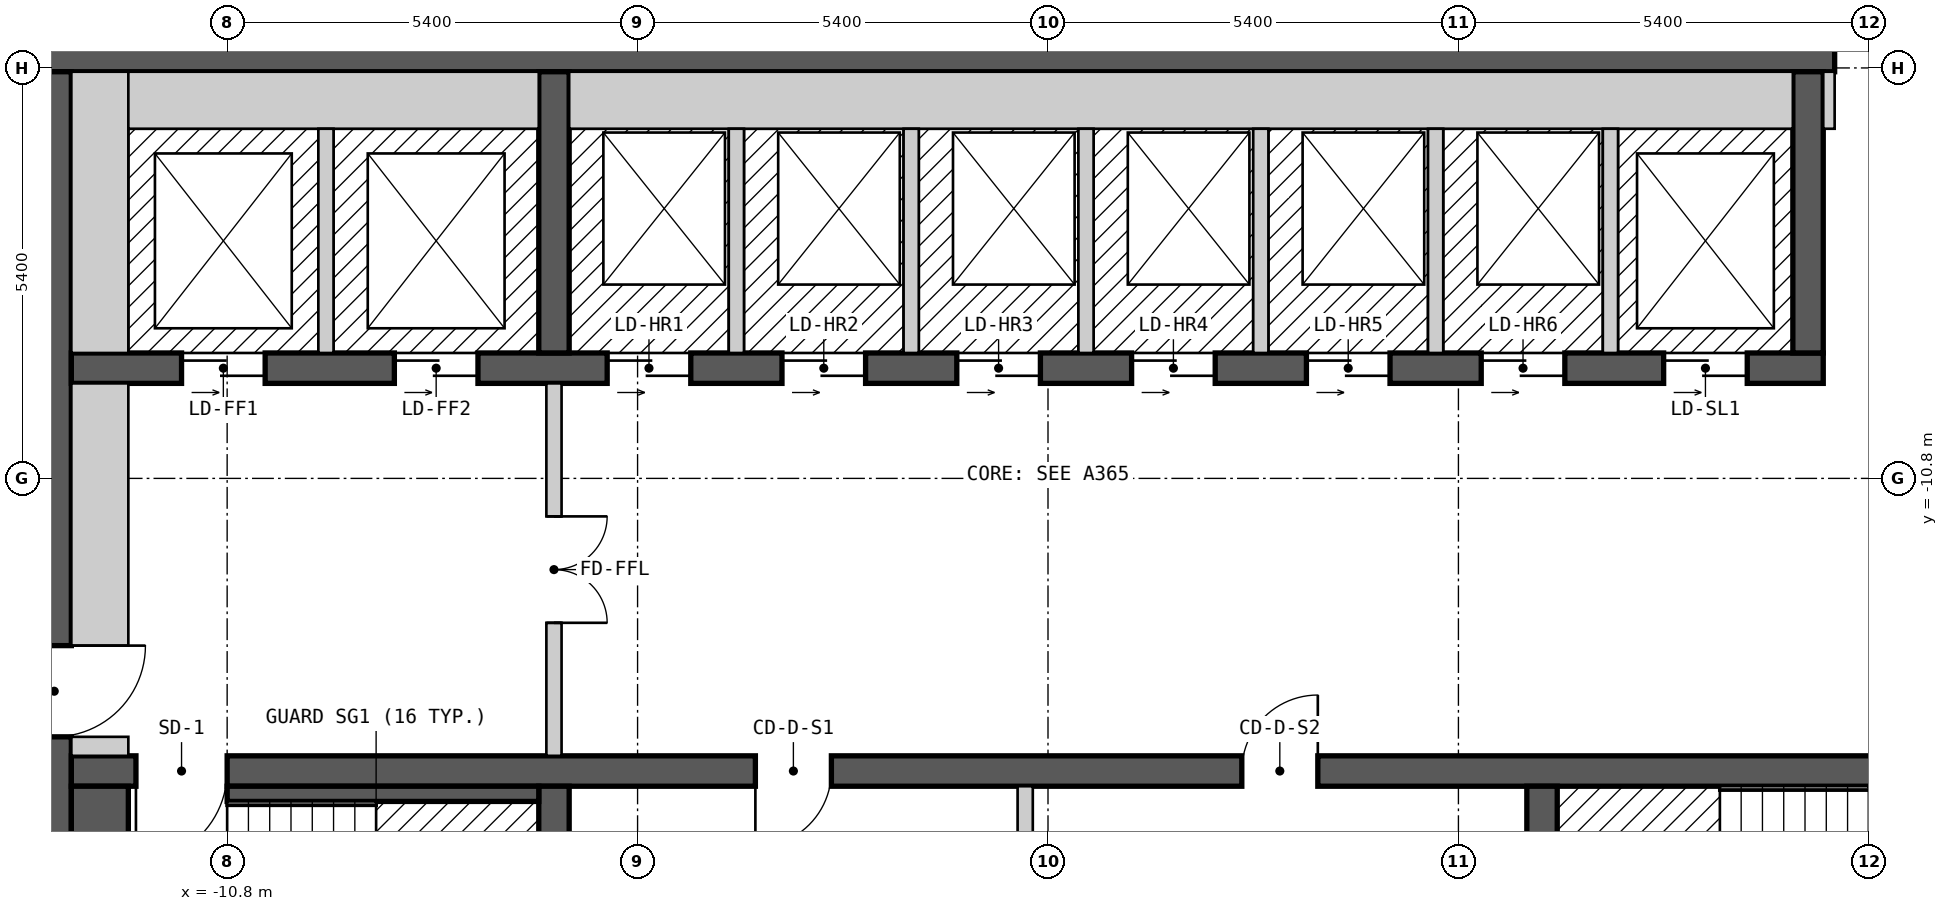
"""IFC4 building model, lengths in metres.
Left out: names, types, materials, properties, quantities, classifications, styles, units other than length and angle.
Written with IfcOpenShell. Run it as: python <this file> out.ifc"""

import sys

from ifc_helpers import new_model, si_unit, direction, frame, frame_2d, origin, place, context, subcontext, project, spatial, rectangle, extrude, element, fill, save


model = new_model("IFC4")
c1 = context("Model", 3, precision=1e-05, world=origin(), true_north=direction((0.0, 1.0)))
c2 = subcontext(c1, "Body", "Model", "MODEL_VIEW")
j1 = project(units=[si_unit("LENGTHUNIT", "METRE"), si_unit("PLANEANGLEUNIT", "RADIAN")], contexts=[c1])
p1 = place(None, origin())
s1 = spatial("IfcSite", under=j1, at=p1, CompositionType="ELEMENT")
p2 = place(p1, origin())
s2 = spatial("IfcBuilding", under=s1, at=p2, CompositionType="ELEMENT")
p3 = place(p2, frame((0.0, 0.0, 238.8)))
s3 = spatial("IfcBuildingStorey", under=s2, at=p3, CompositionType="ELEMENT", Elevation=238.8)
p4 = place(p3, frame((-13.3, -5.225, 0.0), z_axis=(0.0, 0.0, 1.0), x_axis=(1.0, 0.0, 0.0)))
e1 = element("IfcWall", 1, at=p4, inside=s3, PredefinedType="SHEAR", context=c2, shape_type="SweptSolid", body=[
    extrude(rectangle(XDim=26.6, YDim=0.45, at=frame_2d((13.3, 0.0))), origin(), (0.0, 0.0, 1.0), 2.7),
])
p5 = place(p4, frame((23.65, 0.0, 0.0)))
e2 = element("IfcOpeningElement", 2, at=p5, cuts=e1, PredefinedType="OPENING", context=c2, shape_type="SweptSolid", body=[
    extrude(rectangle(XDim=1.2, YDim=2.1, at=frame_2d((0.6, 1.05))), frame((0.0, 0.235, 0.0), z_axis=(0.0, -1.0, 0.0), x_axis=(1.0, 0.0, 0.0)), (0.0, 0.0, 1.0), 0.47),
])
p6 = place(p3, frame((-13.075, -18.55, 0.0), z_axis=(0.0, 0.0, 1.0), x_axis=(0.0, 1.0, 0.0)))
e3 = element("IfcWall", 3, at=p6, inside=s3, PredefinedType="SHEAR", context=c2, shape_type="SweptSolid", body=[
    extrude(rectangle(XDim=13.1, YDim=0.45, at=frame_2d((6.55, 0.0))), origin(), (0.0, 0.0, 1.0), 2.7),
])
p7 = place(p6, frame((4.35, 0.0, 0.0)))
e4 = element("IfcOpeningElement", 4, at=p7, cuts=e3, PredefinedType="OPENING", context=c2, shape_type="SweptSolid", body=[
    extrude(rectangle(XDim=1.2, YDim=2.1, at=frame_2d((0.6, 1.05))), frame((0.0, 0.235, 0.0), z_axis=(0.0, -1.0, 0.0), x_axis=(1.0, 0.0, 0.0)), (0.0, 0.0, 1.0), 0.47),
])
p8 = place(p3, frame((-12.85, -14.65, 0.0), z_axis=(0.0, 0.0, 1.0), x_axis=(1.0, 0.0, 0.0)))
e5 = element("IfcWall", 5, at=p8, inside=s3, PredefinedType="SHEAR", context=c2, shape_type="SweptSolid", body=[
    extrude(rectangle(XDim=25.7, YDim=0.4, at=frame_2d((12.85, 0.0))), origin(), (0.0, 0.0, 1.0), 2.7),
])
p9 = place(p8, frame((2.05, 0.0, 0.0), z_axis=(0.0, 0.0, 1.0), x_axis=(-1.0, 0.0, 0.0)))
e6 = element("IfcOpeningElement", 6, at=p9, cuts=e5, PredefinedType="OPENING", context=c2, shape_type="SweptSolid", body=[
    extrude(rectangle(XDim=1.2, YDim=2.1, at=frame_2d((0.6, 1.05))), frame((0.0, 0.21, 0.0), z_axis=(0.0, -1.0, 0.0), x_axis=(1.0, 0.0, 0.0)), (0.0, 0.0, 1.0), 0.42),
])
p10 = place(p8, frame((24.9, 0.0, 0.0), z_axis=(0.0, 0.0, 1.0), x_axis=(-1.0, 0.0, 0.0)))
e7 = element("IfcOpeningElement", 7, at=p10, cuts=e5, PredefinedType="OPENING", context=c2, shape_type="SweptSolid", body=[
    extrude(rectangle(XDim=1.2, YDim=2.1, at=frame_2d((0.6, 1.05))), frame((0.0, 0.21, 0.0), z_axis=(0.0, -1.0, 0.0), x_axis=(1.0, 0.0, 0.0)), (0.0, 0.0, 1.0), 0.42),
])
p11 = place(p8, frame((10.0, 0.0, 0.0), z_axis=(0.0, 0.0, 1.0), x_axis=(-1.0, 0.0, 0.0)))
e8 = element("IfcOpeningElement", 8, at=p11, cuts=e5, PredefinedType="OPENING", context=c2, shape_type="SweptSolid", body=[
    extrude(rectangle(XDim=1.0, YDim=2.1, at=frame_2d((0.5, 1.05))), frame((0.0, 0.21, 0.0), z_axis=(0.0, -1.0, 0.0), x_axis=(1.0, 0.0, 0.0)), (0.0, 0.0, 1.0), 0.42),
])
p12 = place(p8, frame((16.4, 0.0, 0.0), z_axis=(0.0, 0.0, 1.0), x_axis=(-1.0, 0.0, 0.0)))
e9 = element("IfcOpeningElement", 9, at=p12, cuts=e5, PredefinedType="OPENING", context=c2, shape_type="SweptSolid", body=[
    extrude(rectangle(XDim=1.0, YDim=2.1, at=frame_2d((0.5, 1.05))), frame((0.0, 0.21, 0.0), z_axis=(0.0, -1.0, 0.0), x_axis=(1.0, 0.0, 0.0)), (0.0, 0.0, 1.0), 0.42),
])
p13 = place(p3, frame((-12.85, -9.35, 0.0), z_axis=(0.0, 0.0, 1.0), x_axis=(1.0, 0.0, 0.0)))
e10 = element("IfcWall", 10, at=p13, inside=s3, PredefinedType="SHEAR", context=c2, shape_type="SweptSolid", body=[
    extrude(rectangle(XDim=23.05, YDim=0.4, at=frame_2d((11.525, 0.0))), origin(), (0.0, 0.0, 1.0), 2.7),
])
p14 = place(p13, frame((1.45, 0.0, 0.0)))
e11 = element("IfcOpeningElement", 11, at=p14, cuts=e10, PredefinedType="OPENING", context=c2, shape_type="SweptSolid", body=[
    extrude(rectangle(XDim=1.1, YDim=2.1, at=frame_2d((0.55, 1.05))), frame((0.0, 0.21, 0.0), z_axis=(0.0, -1.0, 0.0), x_axis=(1.0, 0.0, 0.0)), (0.0, 0.0, 1.0), 0.42),
])
p15 = place(p13, frame((4.25, 0.0, 0.0)))
e12 = element("IfcOpeningElement", 12, at=p15, cuts=e10, PredefinedType="OPENING", context=c2, shape_type="SweptSolid", body=[
    extrude(rectangle(XDim=1.1, YDim=2.1, at=frame_2d((0.55, 1.05))), frame((0.0, 0.21, 0.0), z_axis=(0.0, -1.0, 0.0), x_axis=(1.0, 0.0, 0.0)), (0.0, 0.0, 1.0), 0.42),
])
p16 = place(p13, frame((7.05, 0.0, 0.0)))
e13 = element("IfcOpeningElement", 13, at=p16, cuts=e10, PredefinedType="OPENING", context=c2, shape_type="SweptSolid", body=[
    extrude(rectangle(XDim=1.1, YDim=2.1, at=frame_2d((0.55, 1.05))), frame((0.0, 0.21, 0.0), z_axis=(0.0, -1.0, 0.0), x_axis=(1.0, 0.0, 0.0)), (0.0, 0.0, 1.0), 0.42),
])
p17 = place(p13, frame((9.35, 0.0, 0.0)))
e14 = element("IfcOpeningElement", 14, at=p17, cuts=e10, PredefinedType="OPENING", context=c2, shape_type="SweptSolid", body=[
    extrude(rectangle(XDim=1.1, YDim=2.1, at=frame_2d((0.55, 1.05))), frame((0.0, 0.21, 0.0), z_axis=(0.0, -1.0, 0.0), x_axis=(1.0, 0.0, 0.0)), (0.0, 0.0, 1.0), 0.42),
])
p18 = place(p13, frame((11.65, 0.0, 0.0)))
e15 = element("IfcOpeningElement", 15, at=p18, cuts=e10, PredefinedType="OPENING", context=c2, shape_type="SweptSolid", body=[
    extrude(rectangle(XDim=1.1, YDim=2.1, at=frame_2d((0.55, 1.05))), frame((0.0, 0.21, 0.0), z_axis=(0.0, -1.0, 0.0), x_axis=(1.0, 0.0, 0.0)), (0.0, 0.0, 1.0), 0.42),
])
p19 = place(p13, frame((13.95, 0.0, 0.0)))
e16 = element("IfcOpeningElement", 16, at=p19, cuts=e10, PredefinedType="OPENING", context=c2, shape_type="SweptSolid", body=[
    extrude(rectangle(XDim=1.1, YDim=2.1, at=frame_2d((0.55, 1.05))), frame((0.0, 0.21, 0.0), z_axis=(0.0, -1.0, 0.0), x_axis=(1.0, 0.0, 0.0)), (0.0, 0.0, 1.0), 0.42),
])
p20 = place(p13, frame((16.25, 0.0, 0.0)))
e17 = element("IfcOpeningElement", 17, at=p20, cuts=e10, PredefinedType="OPENING", context=c2, shape_type="SweptSolid", body=[
    extrude(rectangle(XDim=1.1, YDim=2.1, at=frame_2d((0.55, 1.05))), frame((0.0, 0.21, 0.0), z_axis=(0.0, -1.0, 0.0), x_axis=(1.0, 0.0, 0.0)), (0.0, 0.0, 1.0), 0.42),
])
p21 = place(p13, frame((18.55, 0.0, 0.0)))
e18 = element("IfcOpeningElement", 18, at=p21, cuts=e10, PredefinedType="OPENING", context=c2, shape_type="SweptSolid", body=[
    extrude(rectangle(XDim=1.1, YDim=2.1, at=frame_2d((0.55, 1.05))), frame((0.0, 0.21, 0.0), z_axis=(0.0, -1.0, 0.0), x_axis=(1.0, 0.0, 0.0)), (0.0, 0.0, 1.0), 0.42),
])
p22 = place(p13, frame((20.95, 0.0, 0.0)))
e19 = element("IfcOpeningElement", 19, at=p22, cuts=e10, PredefinedType="OPENING", context=c2, shape_type="SweptSolid", body=[
    extrude(rectangle(XDim=1.1, YDim=2.1, at=frame_2d((0.55, 1.05))), frame((0.0, 0.21, 0.0), z_axis=(0.0, -1.0, 0.0), x_axis=(1.0, 0.0, 0.0)), (0.0, 0.0, 1.0), 0.42),
])
for number, where, z_axis, x_axis in (
    (20, (-6.5, -18.55, 0.0), (0.0, 0.0, 1.0), (0.0, 1.0, 0.0)),
    (21, (6.5, -18.55, 0.0), (0.0, 0.0, 1.0), (0.0, 1.0, 0.0)),
    (22, (-6.5, -9.15, 0.0), (0.0, 0.0, 1.0), (0.0, 1.0, 0.0)),
    (23, (10.0, -9.15, 0.0), (0.0, 0.0, 1.0), (0.0, 1.0, 0.0)),
):
    element("IfcWall", number, at=place(p3, frame(where, z_axis=z_axis, x_axis=x_axis)), inside=s3, PredefinedType="SHEAR", context=c2, shape_type="SweptSolid", body=[
        extrude(rectangle(XDim=3.7, YDim=0.4, at=frame_2d((1.85, 0.0))), origin(), (0.0, 0.0, 1.0), 2.7),
    ])
p23 = place(p3, frame((-12.475, -18.55, 0.0), z_axis=(0.0, 0.0, 1.0), x_axis=(0.0, 1.0, 0.0)))
e24 = element("IfcWall", 24, at=p23, inside=s3, PredefinedType="SOLIDWALL", context=c2, shape_type="SweptSolid", body=[
    extrude(rectangle(XDim=3.7, YDim=0.75, at=frame_2d((1.85, 0.0))), origin(), (0.0, 0.0, 1.0), 2.7),
])
p24 = place(p3, frame((-12.85, -14.325, 0.0), z_axis=(0.0, 0.0, 1.0), x_axis=(1.0, 0.0, 0.0)))
e25 = element("IfcWall", 25, at=p24, inside=s3, PredefinedType="PARTITIONING", context=c2, shape_type="SweptSolid", body=[
    extrude(rectangle(XDim=0.75, YDim=0.25, at=frame_2d((0.375, 0.0))), origin(), (0.0, 0.0, 1.0), 2.7),
])
p25 = place(p3, frame((-12.475, -13.0, 0.0), z_axis=(0.0, 0.0, 1.0), x_axis=(0.0, 1.0, 0.0)))
e26 = element("IfcWall", 26, at=p25, inside=s3, PredefinedType="PARTITIONING", context=c2, shape_type="SweptSolid", body=[
    extrude(rectangle(XDim=3.45, YDim=0.75, at=frame_2d((1.725, 0.0))), origin(), (0.0, 0.0, 1.0), 2.7),
])
p26 = place(p3, frame((-12.475, -9.15, 0.0), z_axis=(0.0, 0.0, 1.0), x_axis=(0.0, 1.0, 0.0)))
e27 = element("IfcWall", 27, at=p26, inside=s3, PredefinedType="SOLIDWALL", context=c2, shape_type="SweptSolid", body=[
    extrude(rectangle(XDim=3.7, YDim=0.75, at=frame_2d((1.85, 0.0))), origin(), (0.0, 0.0, 1.0), 2.7),
])
p27 = place(p3, frame((-12.1, -5.825, 0.0), z_axis=(0.0, 0.0, 1.0), x_axis=(1.0, 0.0, 0.0)))
e28 = element("IfcWall", 28, at=p27, inside=s3, PredefinedType="SOLIDWALL", context=c2, shape_type="SweptSolid", body=[
    extrude(rectangle(XDim=5.4, YDim=0.75, at=frame_2d((2.7, 0.0))), origin(), (0.0, 0.0, 1.0), 2.7),
])
p28 = place(p3, frame((-10.8, -14.95, 0.0), z_axis=(0.0, 0.0, 1.0), x_axis=(1.0, 0.0, 0.0)))
e29 = element("IfcWall", 29, at=p28, inside=s3, PredefinedType="SOLIDWALL", context=c2, shape_type="SweptSolid", body=[
    extrude(rectangle(XDim=4.1, YDim=0.2, at=frame_2d((2.05, 0.0))), origin(), (0.0, 0.0, 1.0), 2.7),
])
p29 = place(p3, frame((-9.5, -9.15, 0.0), z_axis=(0.0, 0.0, 1.0), x_axis=(0.0, 1.0, 0.0)))
e30 = element("IfcWall", 30, at=p29, inside=s3, PredefinedType="SOLIDWALL", context=c2, shape_type="SweptSolid", body=[
    extrude(rectangle(XDim=2.95, YDim=0.2, at=frame_2d((1.475, 0.0))), origin(), (0.0, 0.0, 1.0), 2.7),
])
p30 = place(p3, frame((-6.5, -14.45, 0.0), z_axis=(0.0, 0.0, 1.0), x_axis=(0.0, 1.0, 0.0)))
e31 = element("IfcWall", 31, at=p30, inside=s3, PredefinedType="PARTITIONING", context=c2, shape_type="SweptSolid", body=[
    extrude(rectangle(XDim=4.9, YDim=0.2, at=frame_2d((2.45, 0.0))), origin(), (0.0, 0.0, 1.0), 2.7),
])
p31 = place(p30, frame((3.15, 0.0, 0.0), z_axis=(0.0, 0.0, 1.0), x_axis=(-1.0, 0.0, 0.0)))
e32 = element("IfcOpeningElement", 32, at=p31, cuts=e31, PredefinedType="OPENING", context=c2, shape_type="SweptSolid", body=[
    extrude(rectangle(XDim=1.4, YDim=2.1, at=frame_2d((0.7, 1.05))), frame((0.0, 0.11, 0.0), z_axis=(0.0, -1.0, 0.0), x_axis=(1.0, 0.0, 0.0)), (0.0, 0.0, 1.0), 0.22),
])
p32 = place(p3, frame((-6.3, -5.825, 0.0), z_axis=(0.0, 0.0, 1.0), x_axis=(1.0, 0.0, 0.0)))
e33 = element("IfcWall", 33, at=p32, inside=s3, PredefinedType="SOLIDWALL", context=c2, shape_type="SweptSolid", body=[
    extrude(rectangle(XDim=16.1, YDim=0.75, at=frame_2d((8.05, 0.0))), origin(), (0.0, 0.0, 1.0), 2.7),
])
for number, where, z_axis, x_axis in (
    (34, (-4.1, -9.15, 0.0), (0.0, 0.0, 1.0), (0.0, 1.0, 0.0)),
    (35, (-1.8, -9.15, 0.0), (0.0, 0.0, 1.0), (0.0, 1.0, 0.0)),
):
    element("IfcWall", number, at=place(p3, frame(where, z_axis=z_axis, x_axis=x_axis)), inside=s3, PredefinedType="SOLIDWALL", context=c2, shape_type="SweptSolid", body=[
        extrude(rectangle(XDim=2.95, YDim=0.2, at=frame_2d((1.475, 0.0))), origin(), (0.0, 0.0, 1.0), 2.7),
    ])
p33 = place(p3, frame((-0.3, -17.8, 0.0), z_axis=(0.0, 0.0, 1.0), x_axis=(0.0, 1.0, 0.0)))
e36 = element("IfcWall", 36, at=p33, inside=s3, PredefinedType="PARTITIONING", context=c2, shape_type="SweptSolid", body=[
    extrude(rectangle(XDim=2.95, YDim=0.2, at=frame_2d((1.475, 0.0))), origin(), (0.0, 0.0, 1.0), 2.7),
])
for number, where, z_axis, x_axis in (
    (37, (0.5, -9.15, 0.0), (0.0, 0.0, 1.0), (0.0, 1.0, 0.0)),
    (38, (2.8, -9.15, 0.0), (0.0, 0.0, 1.0), (0.0, 1.0, 0.0)),
    (39, (5.1, -9.15, 0.0), (0.0, 0.0, 1.0), (0.0, 1.0, 0.0)),
    (40, (7.4, -9.15, 0.0), (0.0, 0.0, 1.0), (0.0, 1.0, 0.0)),
):
    element("IfcWall", number, at=place(p3, frame(where, z_axis=z_axis, x_axis=x_axis)), inside=s3, PredefinedType="SOLIDWALL", context=c2, shape_type="SweptSolid", body=[
        extrude(rectangle(XDim=2.95, YDim=0.2, at=frame_2d((1.475, 0.0))), origin(), (0.0, 0.0, 1.0), 2.7),
    ])
p34 = place(p3, frame((10.275, -6.2, 0.0), z_axis=(0.0, 0.0, 1.0), x_axis=(0.0, 1.0, 0.0)))
e41 = element("IfcWall", 41, at=p34, inside=s3, PredefinedType="PARTITIONING", context=c2, shape_type="SweptSolid", body=[
    extrude(rectangle(XDim=0.75, YDim=0.15, at=frame_2d((0.375, 0.0))), origin(), (0.0, 0.0, 1.0), 2.7),
])
p35 = place(p14, origin())
e42 = element("IfcDoor", 42, at=p35, inside=s3, OperationType="DOUBLE_DOOR_SLIDING", PredefinedType="DOOR", context=c2, shape_type="SweptSolid", body=[
    extrude(rectangle(XDim=1.1, YDim=2.1, at=frame_2d((0.55, 1.05))), frame((0.0, 0.025, 0.0), z_axis=(0.0, -1.0, 0.0), x_axis=(1.0, 0.0, 0.0)), (0.0, 0.0, 1.0), 0.05),
])
fill(e11, e42)
p36 = place(p15, origin())
e43 = element("IfcDoor", 43, at=p36, inside=s3, OperationType="DOUBLE_DOOR_SLIDING", PredefinedType="DOOR", context=c2, shape_type="SweptSolid", body=[
    extrude(rectangle(XDim=1.1, YDim=2.1, at=frame_2d((0.55, 1.05))), frame((0.0, 0.025, 0.0), z_axis=(0.0, -1.0, 0.0), x_axis=(1.0, 0.0, 0.0)), (0.0, 0.0, 1.0), 0.05),
])
fill(e12, e43)
p37 = place(p16, origin())
e44 = element("IfcDoor", 44, at=p37, inside=s3, OperationType="DOUBLE_DOOR_SLIDING", PredefinedType="DOOR", context=c2, shape_type="SweptSolid", body=[
    extrude(rectangle(XDim=1.1, YDim=2.1, at=frame_2d((0.55, 1.05))), frame((0.0, 0.025, 0.0), z_axis=(0.0, -1.0, 0.0), x_axis=(1.0, 0.0, 0.0)), (0.0, 0.0, 1.0), 0.05),
])
fill(e13, e44)
p38 = place(p17, origin())
e45 = element("IfcDoor", 45, at=p38, inside=s3, OperationType="DOUBLE_DOOR_SLIDING", PredefinedType="DOOR", context=c2, shape_type="SweptSolid", body=[
    extrude(rectangle(XDim=1.1, YDim=2.1, at=frame_2d((0.55, 1.05))), frame((0.0, 0.025, 0.0), z_axis=(0.0, -1.0, 0.0), x_axis=(1.0, 0.0, 0.0)), (0.0, 0.0, 1.0), 0.05),
])
fill(e14, e45)
p39 = place(p18, origin())
e46 = element("IfcDoor", 46, at=p39, inside=s3, OperationType="DOUBLE_DOOR_SLIDING", PredefinedType="DOOR", context=c2, shape_type="SweptSolid", body=[
    extrude(rectangle(XDim=1.1, YDim=2.1, at=frame_2d((0.55, 1.05))), frame((0.0, 0.025, 0.0), z_axis=(0.0, -1.0, 0.0), x_axis=(1.0, 0.0, 0.0)), (0.0, 0.0, 1.0), 0.05),
])
fill(e15, e46)
p40 = place(p19, origin())
e47 = element("IfcDoor", 47, at=p40, inside=s3, OperationType="DOUBLE_DOOR_SLIDING", PredefinedType="DOOR", context=c2, shape_type="SweptSolid", body=[
    extrude(rectangle(XDim=1.1, YDim=2.1, at=frame_2d((0.55, 1.05))), frame((0.0, 0.025, 0.0), z_axis=(0.0, -1.0, 0.0), x_axis=(1.0, 0.0, 0.0)), (0.0, 0.0, 1.0), 0.05),
])
fill(e16, e47)
p41 = place(p20, origin())
e48 = element("IfcDoor", 48, at=p41, inside=s3, OperationType="DOUBLE_DOOR_SLIDING", PredefinedType="DOOR", context=c2, shape_type="SweptSolid", body=[
    extrude(rectangle(XDim=1.1, YDim=2.1, at=frame_2d((0.55, 1.05))), frame((0.0, 0.025, 0.0), z_axis=(0.0, -1.0, 0.0), x_axis=(1.0, 0.0, 0.0)), (0.0, 0.0, 1.0), 0.05),
])
fill(e17, e48)
p42 = place(p21, origin())
e49 = element("IfcDoor", 49, at=p42, inside=s3, OperationType="DOUBLE_DOOR_SLIDING", PredefinedType="DOOR", context=c2, shape_type="SweptSolid", body=[
    extrude(rectangle(XDim=1.1, YDim=2.1, at=frame_2d((0.55, 1.05))), frame((0.0, 0.025, 0.0), z_axis=(0.0, -1.0, 0.0), x_axis=(1.0, 0.0, 0.0)), (0.0, 0.0, 1.0), 0.05),
])
fill(e18, e49)
p43 = place(p22, origin())
e50 = element("IfcDoor", 50, at=p43, inside=s3, OperationType="DOUBLE_DOOR_SLIDING", PredefinedType="DOOR", context=c2, shape_type="SweptSolid", body=[
    extrude(rectangle(XDim=1.1, YDim=2.1, at=frame_2d((0.55, 1.05))), frame((0.0, 0.025, 0.0), z_axis=(0.0, -1.0, 0.0), x_axis=(1.0, 0.0, 0.0)), (0.0, 0.0, 1.0), 0.05),
])
fill(e19, e50)
p44 = place(p9, origin())
e51 = element("IfcDoor", 51, at=p44, inside=s3, OperationType="SINGLE_SWING_RIGHT", PredefinedType="DOOR", context=c2, shape_type="SweptSolid", body=[
    extrude(rectangle(XDim=1.2, YDim=2.1, at=frame_2d((0.6, 1.05))), frame((0.0, 0.025, 0.0), z_axis=(0.0, -1.0, 0.0), x_axis=(1.0, 0.0, 0.0)), (0.0, 0.0, 1.0), 0.05),
])
fill(e6, e51)
p45 = place(p7, origin())
e52 = element("IfcDoor", 52, at=p45, inside=s3, OperationType="SINGLE_SWING_RIGHT", PredefinedType="DOOR", context=c2, shape_type="SweptSolid", body=[
    extrude(rectangle(XDim=1.2, YDim=2.1, at=frame_2d((0.6, 1.05))), frame((0.0, 0.025, 0.0), z_axis=(0.0, -1.0, 0.0), x_axis=(1.0, 0.0, 0.0)), (0.0, 0.0, 1.0), 0.05),
])
fill(e4, e52)
p46 = place(p31, origin())
e53 = element("IfcDoor", 53, at=p46, inside=s3, OperationType="DOUBLE_DOOR_SINGLE_SWING", PredefinedType="DOOR", context=c2, shape_type="SweptSolid", body=[
    extrude(rectangle(XDim=1.4, YDim=2.1, at=frame_2d((0.7, 1.05))), frame((0.0, 0.025, 0.0), z_axis=(0.0, -1.0, 0.0), x_axis=(1.0, 0.0, 0.0)), (0.0, 0.0, 1.0), 0.05),
])
fill(e32, e53)
p47 = place(p5, origin())
e54 = element("IfcDoor", 54, at=p47, inside=s3, OperationType="DOUBLE_DOOR_SINGLE_SWING", PredefinedType="DOOR", context=c2, shape_type="SweptSolid", body=[
    extrude(rectangle(XDim=1.2, YDim=2.1, at=frame_2d((0.6, 1.05))), frame((0.0, 0.025, 0.0), z_axis=(0.0, -1.0, 0.0), x_axis=(1.0, 0.0, 0.0)), (0.0, 0.0, 1.0), 0.05),
])
fill(e2, e54)
p48 = place(p11, origin())
e55 = element("IfcDoor", 55, at=p48, inside=s3, OperationType="SINGLE_SWING_RIGHT", PredefinedType="DOOR", context=c2, shape_type="SweptSolid", body=[
    extrude(rectangle(XDim=1.0, YDim=2.1, at=frame_2d((0.5, 1.05))), frame((0.0, 0.025, 0.0), z_axis=(0.0, -1.0, 0.0), x_axis=(1.0, 0.0, 0.0)), (0.0, 0.0, 1.0), 0.05),
])
fill(e8, e55)
p49 = place(p12, origin())
e56 = element("IfcDoor", 56, at=p49, inside=s3, OperationType="SINGLE_SWING_LEFT", PredefinedType="DOOR", context=c2, shape_type="SweptSolid", body=[
    extrude(rectangle(XDim=1.0, YDim=2.1, at=frame_2d((0.5, 1.05))), frame((0.0, 0.025, 0.0), z_axis=(0.0, -1.0, 0.0), x_axis=(1.0, 0.0, 0.0)), (0.0, 0.0, 1.0), 0.05),
])
fill(e9, e56)
save(model, sys.argv[1])
